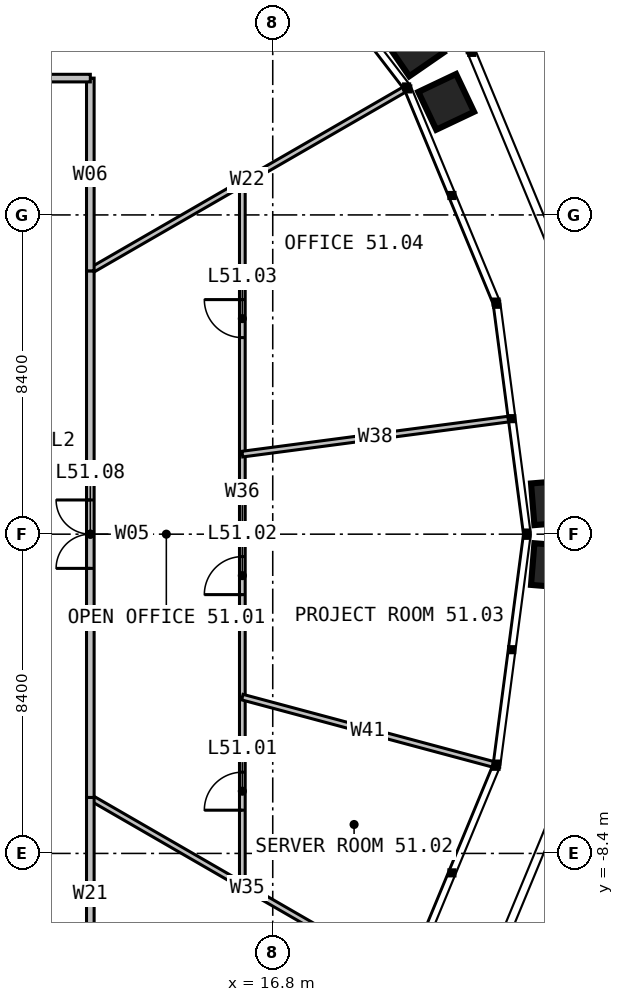
"""IFC4 building model, lengths in metres.
Left out: names, types, materials, properties, quantities, classifications, styles, units other than length and angle.
Written with IfcOpenShell. Run it as: python <this file> out.ifc"""

import sys

from ifc_helpers import new_model, si_unit, direction, frame, frame_2d, origin, place, context, subcontext, project, spatial, rectangle, extrude, element, fill, save


model = new_model("IFC4")
c1 = context("Model", 3, precision=1e-05, world=origin(), true_north=direction((0.0, 1.0)))
c2 = subcontext(c1, "Body", "Model", "MODEL_VIEW")
j1 = project(units=[si_unit("LENGTHUNIT", "METRE"), si_unit("PLANEANGLEUNIT", "RADIAN")], contexts=[c1])
p1 = place(None, origin())
s1 = spatial("IfcSite", under=j1, at=p1, CompositionType="ELEMENT")
p2 = place(p1, origin())
s2 = spatial("IfcBuilding", under=s1, at=p2, CompositionType="ELEMENT")
p3 = place(p2, frame((0.0, 0.0, 211.0)))
s3 = spatial("IfcBuildingStorey", under=s2, at=p3, CompositionType="ELEMENT", Elevation=211.0)
for number, where, z_axis, x_axis in (
    (1, (12.0, -6.928, 0.0), (0.0, 0.0, 1.0), (0.866, -0.5, 0.0)),
    (2, (12.0, 6.928, 0.0), (0.0, 0.0, 1.0), (0.866, 0.5, 0.0)),
    (3, (6.928, 12.0, 0.0), (0.0, 0.0, 1.0), (0.5, 0.866, 0.0)),
):
    element("IfcWall", number, at=place(p3, frame(where, z_axis=z_axis, x_axis=x_axis)), inside=s3, PredefinedType="PARTITIONING", context=c2, shape_type="SweptSolid", body=[
        extrude(rectangle(XDim=9.541, YDim=0.15, at=frame_2d((4.771, 0.0))), origin(), (0.0, 0.0, 1.0), 2.79),
    ])
p4 = place(p3, frame((16.0, -9.238, 0.0), z_axis=(0.0, 0.0, 1.0), x_axis=(0.0, 1.0, 0.0)))
e4 = element("IfcWall", 4, at=p4, inside=s3, PredefinedType="PARTITIONING", context=c2, shape_type="SweptSolid", body=[
    extrude(rectangle(XDim=18.475, YDim=0.15, at=frame_2d((9.238, 0.0))), origin(), (0.0, 0.0, 1.0), 2.79),
])
p5 = place(p4, frame((1.975, 0.0, 0.0)))
e5 = element("IfcOpeningElement", 5, at=p5, cuts=e4, PredefinedType="OPENING", context=c2, shape_type="SweptSolid", body=[
    extrude(rectangle(XDim=1.0, YDim=2.2, at=frame_2d((0.5, 1.1))), frame((0.0, 0.085, 0.0), z_axis=(0.0, -1.0, 0.0), x_axis=(1.0, 0.0, 0.0)), (0.0, 0.0, 1.0), 0.17),
])
p6 = place(p4, frame((7.647, 0.0, 0.0)))
e6 = element("IfcOpeningElement", 6, at=p6, cuts=e4, PredefinedType="OPENING", context=c2, shape_type="SweptSolid", body=[
    extrude(rectangle(XDim=1.0, YDim=2.2, at=frame_2d((0.5, 1.1))), frame((0.0, 0.085, 0.0), z_axis=(0.0, -1.0, 0.0), x_axis=(1.0, 0.0, 0.0)), (0.0, 0.0, 1.0), 0.17),
])
p7 = place(p4, frame((14.41, 0.0, 0.0)))
e7 = element("IfcOpeningElement", 7, at=p7, cuts=e4, PredefinedType="OPENING", context=c2, shape_type="SweptSolid", body=[
    extrude(rectangle(XDim=1.0, YDim=2.2, at=frame_2d((0.5, 1.1))), frame((0.0, 0.085, 0.0), z_axis=(0.0, -1.0, 0.0), x_axis=(1.0, 0.0, 0.0)), (0.0, 0.0, 1.0), 0.17),
])
p8 = place(p3, frame((16.0, -4.287, 0.0), z_axis=(0.0, 0.0, 1.0), x_axis=(0.96592349012, -0.258827763647, 0.0)))
e8 = element("IfcWall", 8, at=p8, inside=s3, PredefinedType="PARTITIONING", context=c2, shape_type="SweptSolid", body=[
    extrude(rectangle(XDim=6.833, YDim=0.15, at=frame_2d((3.417, 0.0))), origin(), (0.0, 0.0, 1.0), 2.79),
])
p9 = place(p3, frame((16.0, 2.106, 0.0), z_axis=(0.0, 0.0, 1.0), x_axis=(0.991444639803, 0.130527875205, 0.0)))
e9 = element("IfcWall", 9, at=p9, inside=s3, PredefinedType="PARTITIONING", context=c2, shape_type="SweptSolid", body=[
    extrude(rectangle(XDim=7.059, YDim=0.15, at=frame_2d((3.529, 0.0))), origin(), (0.0, 0.0, 1.0), 2.79),
])
p10 = place(p3, frame((12.0, -6.928, 0.0), z_axis=(0.0, 0.0, 1.0), x_axis=(0.0, 1.0, 0.0)))
e10 = element("IfcWall", 10, at=p10, inside=s3, PredefinedType="PARTITIONING", context=c2, shape_type="SweptSolid", body=[
    extrude(rectangle(XDim=13.856, YDim=0.2, at=frame_2d((6.928, 0.0))), origin(), (0.0, 0.0, 1.0), 3.8),
])
p11 = place(p10, frame((6.028, 0.0, 0.0)))
e11 = element("IfcOpeningElement", 11, at=p11, cuts=e10, PredefinedType="OPENING", context=c2, shape_type="SweptSolid", body=[
    extrude(rectangle(XDim=1.8, YDim=2.2, at=frame_2d((0.9, 1.1))), frame((0.0, 0.11, 0.0), z_axis=(0.0, -1.0, 0.0), x_axis=(1.0, 0.0, 0.0)), (0.0, 0.0, 1.0), 0.22),
])
p12 = place(p3, frame((12.0, 6.928, 0.0), z_axis=(0.0, 0.0, 1.0), x_axis=(0.0, 1.0, 0.0)))
e12 = element("IfcWall", 12, at=p12, inside=s3, PredefinedType="PARTITIONING", context=c2, shape_type="SweptSolid", body=[
    extrude(rectangle(XDim=5.072, YDim=0.2, at=frame_2d((2.536, 0.0))), origin(), (0.0, 0.0, 1.0), 3.8),
])
p13 = place(p3, frame((12.0, 12.0, 0.0), z_axis=(0.0, 0.0, 1.0), x_axis=(-1.0, 0.0, 0.0)))
e13 = element("IfcWall", 13, at=p13, inside=s3, PredefinedType="PARTITIONING", context=c2, shape_type="SweptSolid", body=[
    extrude(rectangle(XDim=5.072, YDim=0.2, at=frame_2d((2.536, 0.0))), origin(), (0.0, 0.0, 1.0), 3.8),
])
p14 = place(p13, frame((1.636, 0.0, 0.0)))
e14 = element("IfcOpeningElement", 14, at=p14, cuts=e13, PredefinedType="OPENING", context=c2, shape_type="SweptSolid", body=[
    extrude(rectangle(XDim=1.8, YDim=2.2, at=frame_2d((0.9, 1.1))), frame((0.0, 0.11, 0.0), z_axis=(0.0, -1.0, 0.0), x_axis=(1.0, 0.0, 0.0)), (0.0, 0.0, 1.0), 0.22),
])
p15 = place(p3, frame((12.0, -12.0, 0.0), z_axis=(0.0, 0.0, 1.0), x_axis=(0.0, 1.0, 0.0)))
e15 = element("IfcWall", 15, at=p15, inside=s3, PredefinedType="PARTITIONING", context=c2, shape_type="SweptSolid", body=[
    extrude(rectangle(XDim=5.072, YDim=0.2, at=frame_2d((2.536, 0.0))), origin(), (0.0, 0.0, 1.0), 3.8),
])
p16 = place(p5, origin())
e16 = element("IfcDoor", 16, at=p16, inside=s3, OperationType="SINGLE_SWING_LEFT", PredefinedType="DOOR", context=c2, shape_type="SweptSolid", body=[
    extrude(rectangle(XDim=1.0, YDim=2.2, at=frame_2d((0.5, 1.1))), frame((0.0, 0.025, 0.0), z_axis=(0.0, -1.0, 0.0), x_axis=(1.0, 0.0, 0.0)), (0.0, 0.0, 1.0), 0.05),
])
fill(e5, e16)
p17 = place(p6, origin())
e17 = element("IfcDoor", 17, at=p17, inside=s3, OperationType="SINGLE_SWING_LEFT", PredefinedType="DOOR", context=c2, shape_type="SweptSolid", body=[
    extrude(rectangle(XDim=1.0, YDim=2.2, at=frame_2d((0.5, 1.1))), frame((0.0, 0.025, 0.0), z_axis=(0.0, -1.0, 0.0), x_axis=(1.0, 0.0, 0.0)), (0.0, 0.0, 1.0), 0.05),
])
fill(e6, e17)
p18 = place(p7, origin())
e18 = element("IfcDoor", 18, at=p18, inside=s3, OperationType="SINGLE_SWING_RIGHT", PredefinedType="DOOR", context=c2, shape_type="SweptSolid", body=[
    extrude(rectangle(XDim=1.0, YDim=2.2, at=frame_2d((0.5, 1.1))), frame((0.0, 0.025, 0.0), z_axis=(0.0, -1.0, 0.0), x_axis=(1.0, 0.0, 0.0)), (0.0, 0.0, 1.0), 0.05),
])
fill(e7, e18)
p19 = place(p11, origin())
e19 = element("IfcDoor", 19, at=p19, inside=s3, OperationType="DOUBLE_DOOR_SINGLE_SWING", PredefinedType="DOOR", context=c2, shape_type="SweptSolid", body=[
    extrude(rectangle(XDim=1.8, YDim=2.2, at=frame_2d((0.9, 1.1))), frame((0.0, 0.025, 0.0), z_axis=(0.0, -1.0, 0.0), x_axis=(1.0, 0.0, 0.0)), (0.0, 0.0, 1.0), 0.05),
])
fill(e11, e19)
save(model, sys.argv[1])
